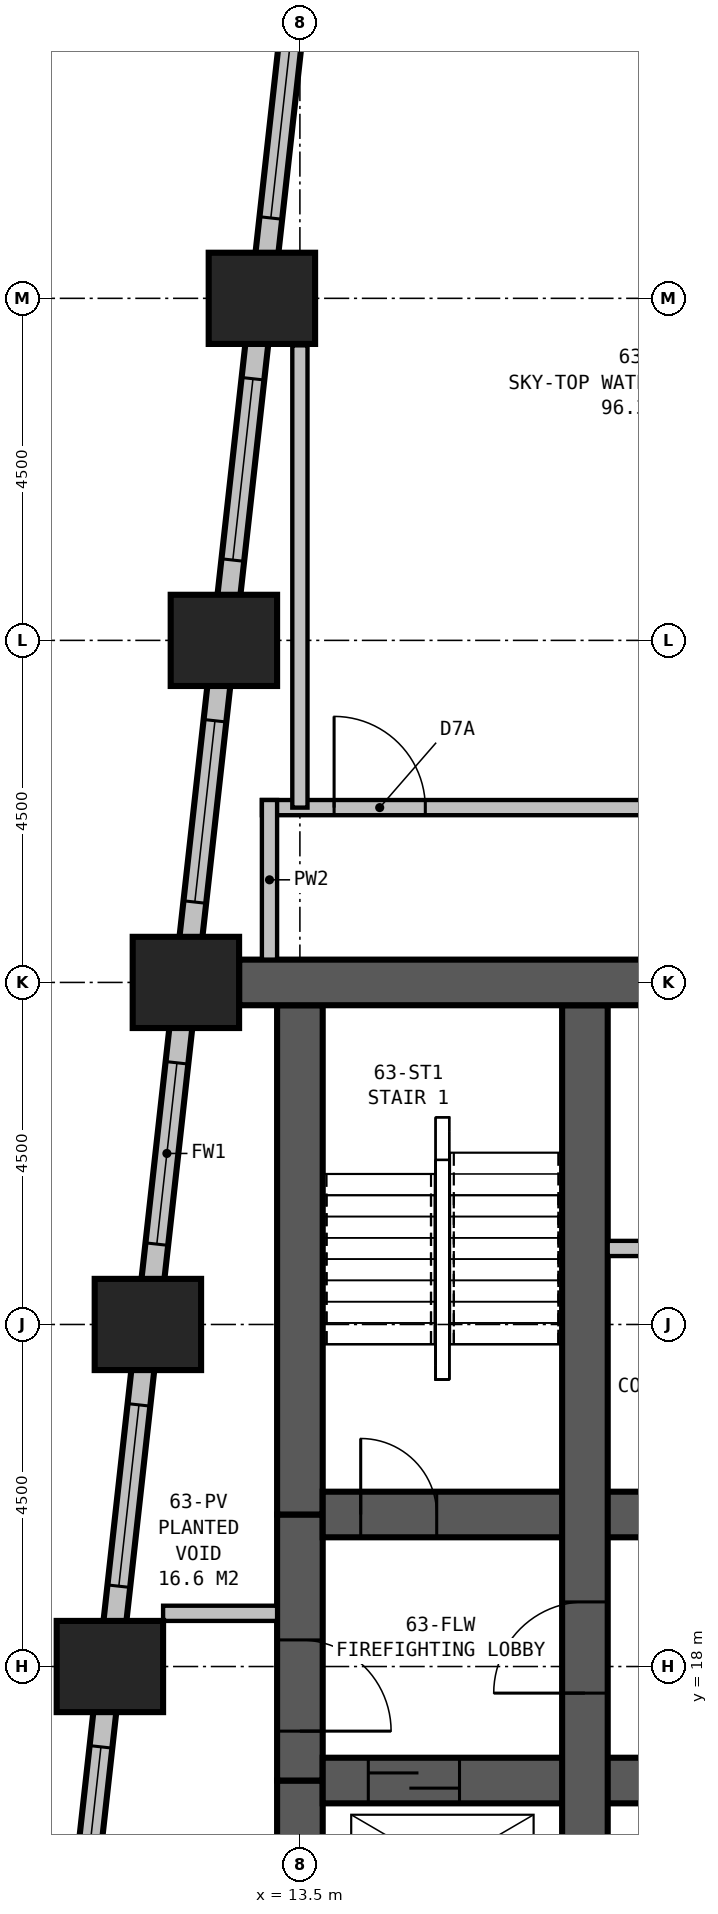
"""IFC4 building model, lengths in metres.
Left out: names, types, materials, properties, quantities, classifications, styles, units other than length and angle.
Written with IfcOpenShell. Run it as: python <this file> out.ifc"""

import sys

from ifc_helpers import new_model, si_unit, direction, frame, frame_2d, origin, origin_2d, place, context, subcontext, project, spatial, rectangle, extrude, element, fill, save


model = new_model("IFC4")
c1 = context("Model", 3, precision=1e-05, world=origin(), true_north=direction((0.0, 1.0)))
c2 = subcontext(c1, "Body", "Model", "MODEL_VIEW")
j1 = project(units=[si_unit("LENGTHUNIT", "METRE"), si_unit("PLANEANGLEUNIT", "RADIAN")], contexts=[c1])
p1 = place(None, origin())
s1 = spatial("IfcSite", under=j1, at=p1, CompositionType="ELEMENT")
p2 = place(p1, origin())
s2 = spatial("IfcBuilding", under=s1, at=p2, CompositionType="ELEMENT")
p3 = place(p2, frame((0.0, 0.0, 244.7)))
s3 = spatial("IfcBuildingStorey", under=s2, at=p3, CompositionType="ELEMENT", Elevation=244.7)
for number, where, z_axis, x_axis in (
    (1, (13.0, 36.0, 0.0), (0.0, 0.0, 1.0), (1.0, 0.0, 0.0)),
    (2, (12.5, 31.5, 0.0), (0.0, 0.0, 1.0), (1.0, 0.0, 0.0)),
    (3, (12.0, 27.0, 0.0), (0.0, 0.0, 1.0), (1.0, 0.0, 0.0)),
    (4, (11.5, 22.5, 0.0), (0.0, 0.0, 1.0), (1.0, 0.0, 0.0)),
    (5, (11.0, 18.0, 0.0), (0.0, 0.0, 1.0), (1.0, 0.0, 0.0)),
):
    element("IfcColumn", number, at=place(p3, frame(where, z_axis=z_axis, x_axis=x_axis)), inside=s3, PredefinedType="COLUMN", context=c2, shape_type="SweptSolid", body=[
        extrude(rectangle(XDim=1.4, YDim=1.2, at=origin_2d()), origin(), (0.0, 0.0, 1.0), 6.0),
    ])
p4 = place(p3, frame((36.3, 27.0, 0.0), z_axis=(0.0, 0.0, 1.0), x_axis=(-1.0, 0.0, 0.0)))
e6 = element("IfcWall", 6, at=p4, inside=s3, PredefinedType="SHEAR", context=c2, shape_type="SweptSolid", body=[
    extrude(rectangle(XDim=23.6, YDim=0.6, at=frame_2d((11.8, 0.0))), origin(), (0.0, 0.0, 1.0), 6.0),
])
p5 = place(p4, frame((17.05, 0.0, 0.0)))
e7 = element("IfcOpeningElement", 7, at=p5, cuts=e6, PredefinedType="OPENING", context=c2, shape_type="SweptSolid", body=[
    extrude(rectangle(XDim=1.0, YDim=2.1, at=frame_2d((0.5, 1.05))), frame((0.0, 0.31, 0.0), z_axis=(0.0, -1.0, 0.0), x_axis=(1.0, 0.0, 0.0)), (0.0, 0.0, 1.0), 0.62),
])
p6 = place(p4, frame((12.05, 0.0, 0.0)))
e8 = element("IfcOpeningElement", 8, at=p6, cuts=e6, PredefinedType="OPENING", context=c2, shape_type="SweptSolid", body=[
    extrude(rectangle(XDim=1.0, YDim=2.1, at=frame_2d((0.5, 1.05))), frame((0.0, 0.31, 0.0), z_axis=(0.0, -1.0, 0.0), x_axis=(1.0, 0.0, 0.0)), (0.0, 0.0, 1.0), 0.62),
])
p7 = place(p4, frame((7.05, 0.0, 0.0)))
e9 = element("IfcOpeningElement", 9, at=p7, cuts=e6, PredefinedType="OPENING", context=c2, shape_type="SweptSolid", body=[
    extrude(rectangle(XDim=1.0, YDim=2.1, at=frame_2d((0.5, 1.05))), frame((0.0, 0.31, 0.0), z_axis=(0.0, -1.0, 0.0), x_axis=(1.0, 0.0, 0.0)), (0.0, 0.0, 1.0), 0.62),
])
p8 = place(p3, frame((17.25, 13.8, 0.0), z_axis=(0.0, 0.0, 1.0), x_axis=(0.0, 1.0, 0.0)))
e10 = element("IfcWall", 10, at=p8, inside=s3, PredefinedType="SHEAR", context=c2, shape_type="SweptSolid", body=[
    extrude(rectangle(XDim=12.9, YDim=0.6, at=frame_2d((6.45, 0.0))), origin(), (0.0, 0.0, 1.0), 6.0),
])
p9 = place(p8, frame((3.85, 0.0, 0.0)))
e11 = element("IfcOpeningElement", 11, at=p9, cuts=e10, PredefinedType="OPENING", context=c2, shape_type="SweptSolid", body=[
    extrude(rectangle(XDim=1.2, YDim=2.1, at=frame_2d((0.6, 1.05))), frame((0.0, 0.31, 0.0), z_axis=(0.0, -1.0, 0.0), x_axis=(1.0, 0.0, 0.0)), (0.0, 0.0, 1.0), 0.62),
])
p10 = place(p3, frame((13.8, 16.5, 0.0), z_axis=(0.0, 0.0, 1.0), x_axis=(1.0, 0.0, 0.0)))
e12 = element("IfcWall", 12, at=p10, inside=s3, PredefinedType="SHEAR", context=c2, shape_type="SweptSolid", body=[
    extrude(rectangle(XDim=21.9, YDim=0.6, at=frame_2d((10.95, 0.0))), origin(), (0.0, 0.0, 1.0), 6.0),
])
p11 = place(p10, frame((5.75, 0.0, 0.0), z_axis=(0.0, 0.0, 1.0), x_axis=(-1.0, 0.0, 0.0)))
e13 = element("IfcOpeningElement", 13, at=p11, cuts=e12, PredefinedType="OPENING", context=c2, shape_type="SweptSolid", body=[
    extrude(rectangle(XDim=1.0, YDim=2.1, at=frame_2d((0.5, 1.05))), frame((0.0, 0.31, 0.0), z_axis=(0.0, -1.0, 0.0), x_axis=(1.0, 0.0, 0.0)), (0.0, 0.0, 1.0), 0.62),
])
p12 = place(p10, frame((10.2, 0.0, 0.0), z_axis=(0.0, 0.0, 1.0), x_axis=(-1.0, 0.0, 0.0)))
e14 = element("IfcOpeningElement", 14, at=p12, cuts=e12, PredefinedType="OPENING", context=c2, shape_type="SweptSolid", body=[
    extrude(rectangle(XDim=1.0, YDim=2.1, at=frame_2d((0.5, 1.05))), frame((0.0, 0.31, 0.0), z_axis=(0.0, -1.0, 0.0), x_axis=(1.0, 0.0, 0.0)), (0.0, 0.0, 1.0), 0.62),
])
p13 = place(p10, frame((12.7, 0.0, 0.0), z_axis=(0.0, 0.0, 1.0), x_axis=(-1.0, 0.0, 0.0)))
e15 = element("IfcOpeningElement", 15, at=p13, cuts=e12, PredefinedType="OPENING", context=c2, shape_type="SweptSolid", body=[
    extrude(rectangle(XDim=1.0, YDim=2.1, at=frame_2d((0.5, 1.05))), frame((0.0, 0.31, 0.0), z_axis=(0.0, -1.0, 0.0), x_axis=(1.0, 0.0, 0.0)), (0.0, 0.0, 1.0), 0.62),
])
p14 = place(p10, frame((17.15, 0.0, 0.0), z_axis=(0.0, 0.0, 1.0), x_axis=(-1.0, 0.0, 0.0)))
e16 = element("IfcOpeningElement", 16, at=p14, cuts=e12, PredefinedType="OPENING", context=c2, shape_type="SweptSolid", body=[
    extrude(rectangle(XDim=1.0, YDim=2.1, at=frame_2d((0.5, 1.05))), frame((0.0, 0.31, 0.0), z_axis=(0.0, -1.0, 0.0), x_axis=(1.0, 0.0, 0.0)), (0.0, 0.0, 1.0), 0.62),
])
p15 = place(p10, frame((0.6, 0.0, 0.0)))
e17 = element("IfcOpeningElement", 17, at=p15, cuts=e12, PredefinedType="OPENING", context=c2, shape_type="SweptSolid", body=[
    extrude(rectangle(XDim=1.2, YDim=2.1, at=frame_2d((0.6, 1.05))), frame((0.0, 0.31, 0.0), z_axis=(0.0, -1.0, 0.0), x_axis=(1.0, 0.0, 0.0)), (0.0, 0.0, 1.0), 0.62),
])
p16 = place(p10, frame((19.6, 0.0, 0.0)))
e18 = element("IfcOpeningElement", 18, at=p16, cuts=e12, PredefinedType="OPENING", context=c2, shape_type="SweptSolid", body=[
    extrude(rectangle(XDim=1.2, YDim=2.1, at=frame_2d((0.6, 1.05))), frame((0.0, 0.31, 0.0), z_axis=(0.0, -1.0, 0.0), x_axis=(1.0, 0.0, 0.0)), (0.0, 0.0, 1.0), 0.62),
])
p17 = place(p3, frame((13.8, 20.0, 0.0), z_axis=(0.0, 0.0, 1.0), x_axis=(1.0, 0.0, 0.0)))
e19 = element("IfcWall", 19, at=p17, inside=s3, PredefinedType="SHEAR", context=c2, shape_type="SweptSolid", body=[
    extrude(rectangle(XDim=21.9, YDim=0.6, at=frame_2d((10.95, 0.0))), origin(), (0.0, 0.0, 1.0), 6.0),
])
p18 = place(p17, frame((0.5, 0.0, 0.0)))
e20 = element("IfcOpeningElement", 20, at=p18, cuts=e19, PredefinedType="OPENING", context=c2, shape_type="SweptSolid", body=[
    extrude(rectangle(XDim=1.0, YDim=2.1, at=frame_2d((0.5, 1.05))), frame((0.0, 0.31, 0.0), z_axis=(0.0, -1.0, 0.0), x_axis=(1.0, 0.0, 0.0)), (0.0, 0.0, 1.0), 0.62),
])
p19 = place(p17, frame((20.5, 0.0, 0.0)))
e21 = element("IfcOpeningElement", 21, at=p19, cuts=e19, PredefinedType="OPENING", context=c2, shape_type="SweptSolid", body=[
    extrude(rectangle(XDim=1.0, YDim=2.1, at=frame_2d((0.5, 1.05))), frame((0.0, 0.31, 0.0), z_axis=(0.0, -1.0, 0.0), x_axis=(1.0, 0.0, 0.0)), (0.0, 0.0, 1.0), 0.62),
])
p20 = place(p17, frame((16.65, 0.0, 0.0)))
e22 = element("IfcOpeningElement", 22, at=p20, cuts=e19, PredefinedType="OPENING", context=c2, shape_type="SweptSolid", body=[
    extrude(rectangle(XDim=1.1, YDim=2.1, at=frame_2d((0.55, 1.05))), frame((0.0, 0.31, 0.0), z_axis=(0.0, -1.0, 0.0), x_axis=(1.0, 0.0, 0.0)), (0.0, 0.0, 1.0), 0.62),
])
p21 = place(p17, frame((5.75, 0.0, 0.0), z_axis=(0.0, 0.0, 1.0), x_axis=(-1.0, 0.0, 0.0)))
e23 = element("IfcOpeningElement", 23, at=p21, cuts=e19, PredefinedType="OPENING", context=c2, shape_type="SweptSolid", body=[
    extrude(rectangle(XDim=1.0, YDim=2.1, at=frame_2d((0.5, 1.05))), frame((0.0, 0.31, 0.0), z_axis=(0.0, -1.0, 0.0), x_axis=(1.0, 0.0, 0.0)), (0.0, 0.0, 1.0), 0.62),
])
p22 = place(p17, frame((6.7, 0.0, 0.0)))
e24 = element("IfcOpeningElement", 24, at=p22, cuts=e19, PredefinedType="OPENING", context=c2, shape_type="SweptSolid", body=[
    extrude(rectangle(XDim=1.0, YDim=2.1, at=frame_2d((0.5, 1.05))), frame((0.0, 0.31, 0.0), z_axis=(0.0, -1.0, 0.0), x_axis=(1.0, 0.0, 0.0)), (0.0, 0.0, 1.0), 0.62),
])
p23 = place(p3, frame((13.5, 26.7, 0.0), z_axis=(0.0, 0.0, 1.0), x_axis=(0.0, -1.0, 0.0)))
e25 = element("IfcWall", 25, at=p23, inside=s3, PredefinedType="SHEAR", context=c2, shape_type="SweptSolid", body=[
    extrude(rectangle(XDim=6.7, YDim=0.6, at=frame_2d((3.35, 0.0))), origin(), (0.0, 0.0, 1.0), 6.0),
])
p24 = place(p3, frame((13.5, 20.0, 0.0), z_axis=(0.0, 0.0, 1.0), x_axis=(0.0, -1.0, 0.0)))
e26 = element("IfcWall", 26, at=p24, inside=s3, PredefinedType="SHEAR", context=c2, shape_type="SweptSolid", body=[
    extrude(rectangle(XDim=3.5, YDim=0.6, at=frame_2d((1.75, 0.0))), origin(), (0.0, 0.0, 1.0), 6.0),
])
p25 = place(p24, frame((1.65, 0.0, 0.0)))
e27 = element("IfcOpeningElement", 27, at=p25, cuts=e26, PredefinedType="OPENING", context=c2, shape_type="SweptSolid", body=[
    extrude(rectangle(XDim=1.2, YDim=2.1, at=frame_2d((0.6, 1.05))), frame((0.0, 0.31, 0.0), z_axis=(0.0, -1.0, 0.0), x_axis=(1.0, 0.0, 0.0)), (0.0, 0.0, 1.0), 0.62),
])
p26 = place(p3, frame((13.5, 16.5, 0.0), z_axis=(0.0, 0.0, 1.0), x_axis=(0.0, -1.0, 0.0)))
e28 = element("IfcWall", 28, at=p26, inside=s3, PredefinedType="SHEAR", context=c2, shape_type="SweptSolid", body=[
    extrude(rectangle(XDim=2.7, YDim=0.6, at=frame_2d((1.35, 0.0))), origin(), (0.0, 0.0, 1.0), 6.0),
])
p27 = place(p3, frame((13.517, 40.649, 0.0), z_axis=(0.0, 0.0, 1.0), x_axis=(-0.110433201132, -0.993883548555, 0.0)))
e29 = element("IfcWall", 29, at=p27, inside=s3, PredefinedType="STANDARD", context=c2, shape_type="SweptSolid", body=[
    extrude(rectangle(XDim=31.994, YDim=0.3, at=frame_2d((15.997, 0.0))), origin(), (0.0, 0.0, 1.0), 4.45),
])
p28 = place(p27, frame((1.214, 0.0, 0.5)))
e30 = element("IfcOpeningElement", 30, at=p28, cuts=e29, PredefinedType="OPENING", context=c2, shape_type="SweptSolid", body=[
    extrude(rectangle(XDim=2.4, YDim=2.0, at=frame_2d((1.2, 1.0))), frame((0.0, 0.16, 0.0), z_axis=(0.0, -1.0, 0.0), x_axis=(1.0, 0.0, 0.0)), (0.0, 0.0, 1.0), 0.32),
])
p29 = place(p27, frame((5.742, 0.0, 0.5)))
e31 = element("IfcOpeningElement", 31, at=p29, cuts=e29, PredefinedType="OPENING", context=c2, shape_type="SweptSolid", body=[
    extrude(rectangle(XDim=2.4, YDim=2.0, at=frame_2d((1.2, 1.0))), frame((0.0, 0.16, 0.0), z_axis=(0.0, -1.0, 0.0), x_axis=(1.0, 0.0, 0.0)), (0.0, 0.0, 1.0), 0.32),
])
p30 = place(p27, frame((10.269, 0.0, 0.5)))
e32 = element("IfcOpeningElement", 32, at=p30, cuts=e29, PredefinedType="OPENING", context=c2, shape_type="SweptSolid", body=[
    extrude(rectangle(XDim=2.4, YDim=2.0, at=frame_2d((1.2, 1.0))), frame((0.0, 0.16, 0.0), z_axis=(0.0, -1.0, 0.0), x_axis=(1.0, 0.0, 0.0)), (0.0, 0.0, 1.0), 0.32),
])
p31 = place(p27, frame((14.797, 0.0, 0.5)))
e33 = element("IfcOpeningElement", 33, at=p31, cuts=e29, PredefinedType="OPENING", context=c2, shape_type="SweptSolid", body=[
    extrude(rectangle(XDim=2.4, YDim=2.0, at=frame_2d((1.2, 1.0))), frame((0.0, 0.16, 0.0), z_axis=(0.0, -1.0, 0.0), x_axis=(1.0, 0.0, 0.0)), (0.0, 0.0, 1.0), 0.32),
])
p32 = place(p27, frame((19.325, 0.0, 0.5)))
e34 = element("IfcOpeningElement", 34, at=p32, cuts=e29, PredefinedType="OPENING", context=c2, shape_type="SweptSolid", body=[
    extrude(rectangle(XDim=2.4, YDim=2.0, at=frame_2d((1.2, 1.0))), frame((0.0, 0.16, 0.0), z_axis=(0.0, -1.0, 0.0), x_axis=(1.0, 0.0, 0.0)), (0.0, 0.0, 1.0), 0.32),
])
p33 = place(p27, frame((23.852, 0.0, 0.5)))
e35 = element("IfcOpeningElement", 35, at=p33, cuts=e29, PredefinedType="OPENING", context=c2, shape_type="SweptSolid", body=[
    extrude(rectangle(XDim=2.4, YDim=2.0, at=frame_2d((1.2, 1.0))), frame((0.0, 0.16, 0.0), z_axis=(0.0, -1.0, 0.0), x_axis=(1.0, 0.0, 0.0)), (0.0, 0.0, 1.0), 0.32),
])
p34 = place(p27, frame((28.38, 0.0, 0.5)))
e36 = element("IfcOpeningElement", 36, at=p34, cuts=e29, PredefinedType="OPENING", context=c2, shape_type="SweptSolid", body=[
    extrude(rectangle(XDim=2.4, YDim=2.0, at=frame_2d((1.2, 1.0))), frame((0.0, 0.16, 0.0), z_axis=(0.0, -1.0, 0.0), x_axis=(1.0, 0.0, 0.0)), (0.0, 0.0, 1.0), 0.32),
])
p35 = place(p3, frame((13.0, 29.3, 0.0), z_axis=(0.0, 0.0, 1.0), x_axis=(1.0, 0.0, 0.0)))
e37 = element("IfcWall", 37, at=p35, inside=s3, PredefinedType="PARTITIONING", context=c2, shape_type="SweptSolid", body=[
    extrude(rectangle(XDim=25.3, YDim=0.2, at=frame_2d((12.65, 0.0))), origin(), (0.0, 0.0, 1.0), 5.75),
])
p36 = place(p35, frame((0.95, 0.0, 0.0)))
e38 = element("IfcOpeningElement", 38, at=p36, cuts=e37, PredefinedType="OPENING", context=c2, shape_type="SweptSolid", body=[
    extrude(rectangle(XDim=1.2, YDim=2.1, at=frame_2d((0.6, 1.05))), frame((0.0, 0.11, 0.0), z_axis=(0.0, -1.0, 0.0), x_axis=(1.0, 0.0, 0.0)), (0.0, 0.0, 1.0), 0.22),
])
p37 = place(p35, frame((9.95, 0.0, 0.0)))
e39 = element("IfcOpeningElement", 39, at=p37, cuts=e37, PredefinedType="OPENING", context=c2, shape_type="SweptSolid", body=[
    extrude(rectangle(XDim=1.0, YDim=2.1, at=frame_2d((0.5, 1.05))), frame((0.0, 0.11, 0.0), z_axis=(0.0, -1.0, 0.0), x_axis=(1.0, 0.0, 0.0)), (0.0, 0.0, 1.0), 0.22),
])
p38 = place(p35, frame((14.45, 0.0, 0.0)))
e40 = element("IfcOpeningElement", 40, at=p38, cuts=e37, PredefinedType="OPENING", context=c2, shape_type="SweptSolid", body=[
    extrude(rectangle(XDim=1.2, YDim=2.1, at=frame_2d((0.6, 1.05))), frame((0.0, 0.11, 0.0), z_axis=(0.0, -1.0, 0.0), x_axis=(1.0, 0.0, 0.0)), (0.0, 0.0, 1.0), 0.22),
])
p39 = place(p35, frame((23.55, 0.0, 0.0)))
e41 = element("IfcOpeningElement", 41, at=p39, cuts=e37, PredefinedType="OPENING", context=c2, shape_type="SweptSolid", body=[
    extrude(rectangle(XDim=1.2, YDim=2.1, at=frame_2d((0.6, 1.05))), frame((0.0, 0.11, 0.0), z_axis=(0.0, -1.0, 0.0), x_axis=(1.0, 0.0, 0.0)), (0.0, 0.0, 1.0), 0.22),
])
p40 = place(p3, frame((13.5, 29.3, 0.0), z_axis=(0.0, 0.0, 1.0), x_axis=(0.0, 1.0, 0.0)))
e42 = element("IfcWall", 42, at=p40, inside=s3, PredefinedType="PARTITIONING", context=c2, shape_type="SweptSolid", body=[
    extrude(rectangle(XDim=6.082, YDim=0.2, at=frame_2d((3.041, 0.0))), origin(), (0.0, 0.0, 1.0), 4.45),
])
p41 = place(p3, frame((13.2, 18.7, 0.0), z_axis=(0.0, 0.0, 1.0), x_axis=(-1.0, 0.0, 0.0)))
e43 = element("IfcWall", 43, at=p41, inside=s3, PredefinedType="PARTITIONING", context=c2, shape_type="SweptSolid", body=[
    extrude(rectangle(XDim=1.5, YDim=0.2, at=frame_2d((0.75, 0.0))), origin(), (0.0, 0.0, 1.0), 5.75),
])
p42 = place(p3, frame((13.1, 27.3, 0.0), z_axis=(0.0, 0.0, 1.0), x_axis=(0.0, 1.0, 0.0)))
e44 = element("IfcWall", 44, at=p42, inside=s3, PredefinedType="PARTITIONING", context=c2, shape_type="SweptSolid", body=[
    extrude(rectangle(XDim=2.1, YDim=0.2, at=frame_2d((1.05, 0.0))), origin(), (0.0, 0.0, 1.0), 5.75),
])
p43 = place(p3, frame((17.55, 23.5, 0.0), z_axis=(0.0, 0.0, 1.0), x_axis=(1.0, 0.0, 0.0)))
e45 = element("IfcWall", 45, at=p43, inside=s3, PredefinedType="PARTITIONING", context=c2, shape_type="SweptSolid", body=[
    extrude(rectangle(XDim=14.4, YDim=0.2, at=frame_2d((7.2, 0.0))), origin(), (0.0, 0.0, 1.0), 5.75),
])
p44 = place(p43, frame((0.45, 0.0, 0.0)))
e46 = element("IfcOpeningElement", 46, at=p44, cuts=e45, PredefinedType="OPENING", context=c2, shape_type="SweptSolid", body=[
    extrude(rectangle(XDim=1.0, YDim=2.1, at=frame_2d((0.5, 1.05))), frame((0.0, 0.11, 0.0), z_axis=(0.0, -1.0, 0.0), x_axis=(1.0, 0.0, 0.0)), (0.0, 0.0, 1.0), 0.22),
])
p45 = place(p28, origin())
e47 = element("IfcWindow", 47, at=p45, inside=s3, PartitioningType="SINGLE_PANEL", PredefinedType="USERDEFINED", context=c2, shape_type="SweptSolid", body=[
    extrude(rectangle(XDim=2.4, YDim=2.0, at=frame_2d((1.2, 1.0))), frame((0.0, 0.03, 0.0), z_axis=(0.0, -1.0, 0.0), x_axis=(1.0, 0.0, 0.0)), (0.0, 0.0, 1.0), 0.06),
])
fill(e30, e47)
p46 = place(p29, origin())
e48 = element("IfcWindow", 48, at=p46, inside=s3, PartitioningType="SINGLE_PANEL", PredefinedType="USERDEFINED", context=c2, shape_type="SweptSolid", body=[
    extrude(rectangle(XDim=2.4, YDim=2.0, at=frame_2d((1.2, 1.0))), frame((0.0, 0.03, 0.0), z_axis=(0.0, -1.0, 0.0), x_axis=(1.0, 0.0, 0.0)), (0.0, 0.0, 1.0), 0.06),
])
fill(e31, e48)
p47 = place(p30, origin())
e49 = element("IfcWindow", 49, at=p47, inside=s3, PartitioningType="SINGLE_PANEL", PredefinedType="USERDEFINED", context=c2, shape_type="SweptSolid", body=[
    extrude(rectangle(XDim=2.4, YDim=2.0, at=frame_2d((1.2, 1.0))), frame((0.0, 0.03, 0.0), z_axis=(0.0, -1.0, 0.0), x_axis=(1.0, 0.0, 0.0)), (0.0, 0.0, 1.0), 0.06),
])
fill(e32, e49)
p48 = place(p31, origin())
e50 = element("IfcWindow", 50, at=p48, inside=s3, PartitioningType="SINGLE_PANEL", PredefinedType="USERDEFINED", context=c2, shape_type="SweptSolid", body=[
    extrude(rectangle(XDim=2.4, YDim=2.0, at=frame_2d((1.2, 1.0))), frame((0.0, 0.03, 0.0), z_axis=(0.0, -1.0, 0.0), x_axis=(1.0, 0.0, 0.0)), (0.0, 0.0, 1.0), 0.06),
])
fill(e33, e50)
p49 = place(p32, origin())
e51 = element("IfcWindow", 51, at=p49, inside=s3, PartitioningType="SINGLE_PANEL", PredefinedType="USERDEFINED", context=c2, shape_type="SweptSolid", body=[
    extrude(rectangle(XDim=2.4, YDim=2.0, at=frame_2d((1.2, 1.0))), frame((0.0, 0.03, 0.0), z_axis=(0.0, -1.0, 0.0), x_axis=(1.0, 0.0, 0.0)), (0.0, 0.0, 1.0), 0.06),
])
fill(e34, e51)
p50 = place(p33, origin())
e52 = element("IfcWindow", 52, at=p50, inside=s3, PartitioningType="SINGLE_PANEL", PredefinedType="USERDEFINED", context=c2, shape_type="SweptSolid", body=[
    extrude(rectangle(XDim=2.4, YDim=2.0, at=frame_2d((1.2, 1.0))), frame((0.0, 0.03, 0.0), z_axis=(0.0, -1.0, 0.0), x_axis=(1.0, 0.0, 0.0)), (0.0, 0.0, 1.0), 0.06),
])
fill(e35, e52)
p51 = place(p36, origin())
e53 = element("IfcDoor", 53, at=p51, inside=s3, OperationType="SINGLE_SWING_LEFT", PredefinedType="DOOR", context=c2, shape_type="SweptSolid", body=[
    extrude(rectangle(XDim=1.2, YDim=2.1, at=frame_2d((0.6, 1.05))), frame((0.0, 0.025, 0.0), z_axis=(0.0, -1.0, 0.0), x_axis=(1.0, 0.0, 0.0)), (0.0, 0.0, 1.0), 0.05),
])
fill(e38, e53)
p52 = place(p25, origin())
e54 = element("IfcDoor", 54, at=p52, inside=s3, OperationType="SINGLE_SWING_RIGHT", PredefinedType="DOOR", context=c2, shape_type="SweptSolid", body=[
    extrude(rectangle(XDim=1.2, YDim=2.1, at=frame_2d((0.6, 1.05))), frame((0.0, 0.3, 0.0), z_axis=(0.0, -1.0, 0.0), x_axis=(1.0, 0.0, 0.0)), (0.0, 0.0, 1.0), 0.6),
])
fill(e27, e54)
p53 = place(p9, origin())
e55 = element("IfcDoor", 55, at=p53, inside=s3, OperationType="SINGLE_SWING_LEFT", PredefinedType="DOOR", context=c2, shape_type="SweptSolid", body=[
    extrude(rectangle(XDim=1.2, YDim=2.1, at=frame_2d((0.6, 1.05))), frame((0.0, 0.3, 0.0), z_axis=(0.0, -1.0, 0.0), x_axis=(1.0, 0.0, 0.0)), (0.0, 0.0, 1.0), 0.6),
])
fill(e11, e55)
p54 = place(p18, origin())
e56 = element("IfcDoor", 56, at=p54, inside=s3, OperationType="SINGLE_SWING_LEFT", PredefinedType="DOOR", context=c2, shape_type="SweptSolid", body=[
    extrude(rectangle(XDim=1.0, YDim=2.1, at=frame_2d((0.5, 1.05))), frame((0.0, 0.3, 0.0), z_axis=(0.0, -1.0, 0.0), x_axis=(1.0, 0.0, 0.0)), (0.0, 0.0, 1.0), 0.6),
])
fill(e20, e56)
p55 = place(p15, origin())
e57 = element("IfcDoor", 57, at=p55, inside=s3, OperationType="SLIDING_TO_LEFT", PredefinedType="DOOR", context=c2, shape_type="SweptSolid", body=[
    extrude(rectangle(XDim=1.2, YDim=2.1, at=frame_2d((0.6, 1.05))), frame((0.0, 0.3, 0.0), z_axis=(0.0, -1.0, 0.0), x_axis=(1.0, 0.0, 0.0)), (0.0, 0.0, 1.0), 0.6),
])
fill(e17, e57)
save(model, sys.argv[1])
